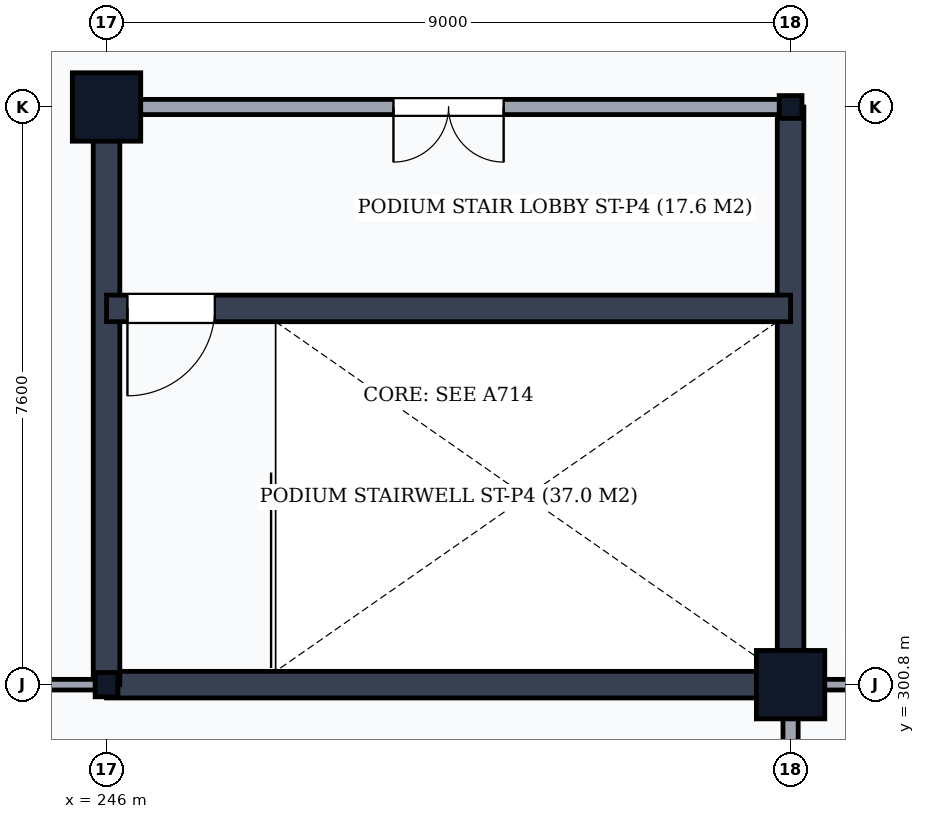
"""IFC4 building model, lengths in metres.
Left out: names, types, materials, properties, quantities, classifications, styles, units other than length and angle.
Written with IfcOpenShell. Run it as: python <this file> out.ifc"""

import sys

from ifc_helpers import new_model, si_unit, direction, frame, frame_2d, origin, origin_2d, place, context, subcontext, project, spatial, rectangle, circle, i_section, extrude, element, fill, save


model = new_model("IFC4")
c1 = context("Model", 3, precision=1e-05, world=origin(), true_north=direction((0.0, 1.0)))
c2 = subcontext(c1, "Body", "Model", "MODEL_VIEW")
j1 = project(units=[si_unit("LENGTHUNIT", "METRE"), si_unit("PLANEANGLEUNIT", "RADIAN")], contexts=[c1])
p1 = place(None, origin())
s1 = spatial("IfcSite", under=j1, at=p1, CompositionType="ELEMENT")
p2 = place(p1, origin())
s2 = spatial("IfcBuilding", under=s1, at=p2, CompositionType="ELEMENT")
p3 = place(p2, frame((0.0, 0.0, 15.6)))
s3 = spatial("IfcBuildingStorey", under=s2, at=p3, CompositionType="ELEMENT", Elevation=15.6)
p4 = place(p3, frame((246.0, 300.8, 0.0), z_axis=(0.0, 0.0, 1.0), x_axis=(1.0, 0.0, 0.0)))
e1 = element("IfcColumn", 1, at=p4, inside=s3, PredefinedType="COLUMN", context=c2, shape_type="SweptSolid", body=[
    extrude(i_section(OverallWidth=0.3, OverallDepth=0.32, WebThickness=0.011, FlangeThickness=0.021, FilletRadius=0.027, at=origin_2d()), origin(), (0.0, 0.0, 1.0), 4.8),
])
for number, where, z_axis, x_axis in (
    (2, (246.0, 308.4, 0.0), (0.0, 0.0, 1.0), (1.0, 0.0, 0.0)),
    (3, (255.0, 300.8, 0.0), (0.0, 0.0, 1.0), (1.0, 0.0, 0.0)),
):
    element("IfcColumn", number, at=place(p3, frame(where, z_axis=z_axis, x_axis=x_axis)), inside=s3, PredefinedType="COLUMN", context=c2, shape_type="SweptSolid", body=[
        extrude(circle(Radius=0.45, at=origin_2d()), origin(), (0.0, 0.0, 1.0), 4.8),
    ])
p5 = place(p3, frame((255.0, 308.4, 0.0), z_axis=(0.0, 0.0, 1.0), x_axis=(1.0, 0.0, 0.0)))
e4 = element("IfcColumn", 4, at=p5, inside=s3, PredefinedType="COLUMN", context=c2, shape_type="SweptSolid", body=[
    extrude(i_section(OverallWidth=0.3, OverallDepth=0.3, WebThickness=0.011, FlangeThickness=0.019, FilletRadius=0.027, at=origin_2d()), origin(), (0.0, 0.0, 1.0), 4.8),
])
p6 = place(p3, frame((246.0, 300.8, 0.0), z_axis=(0.0, 0.0, 1.0), x_axis=(1.0, 0.0, 0.0)))
e5 = element("IfcWall", 5, at=p6, inside=s3, PredefinedType="SHEAR", context=c2, shape_type="SweptSolid", body=[
    extrude(rectangle(XDim=9.0, YDim=0.35, at=frame_2d((4.5, 0.0))), origin(), (0.0, 0.0, 1.0), 4.55),
])
for number, where, z_axis, x_axis in (
    (6, (246.0, 300.8, 0.0), (0.0, 0.0, 1.0), (0.0, 1.0, 0.0)),
    (7, (255.0, 300.8, 0.0), (0.0, 0.0, 1.0), (0.0, 1.0, 0.0)),
):
    element("IfcWall", number, at=place(p3, frame(where, z_axis=z_axis, x_axis=x_axis)), inside=s3, PredefinedType="SHEAR", context=c2, shape_type="SweptSolid", body=[
        extrude(rectangle(XDim=7.6, YDim=0.35, at=frame_2d((3.8, 0.0))), origin(), (0.0, 0.0, 1.0), 4.55),
    ])
p7 = place(p3, frame((246.0, 305.75, 0.0), z_axis=(0.0, 0.0, 1.0), x_axis=(1.0, 0.0, 0.0)))
e8 = element("IfcWall", 8, at=p7, inside=s3, PredefinedType="SHEAR", context=c2, shape_type="SweptSolid", body=[
    extrude(rectangle(XDim=9.0, YDim=0.35, at=frame_2d((4.5, 0.0))), origin(), (0.0, 0.0, 1.0), 4.55),
])
p8 = place(p7, frame((0.275, 0.0, 0.0)))
e9 = element("IfcOpeningElement", 9, at=p8, cuts=e8, PredefinedType="OPENING", context=c2, shape_type="SweptSolid", body=[
    extrude(rectangle(XDim=1.15, YDim=2.15, at=frame_2d((0.575, 1.075))), frame((0.0, 0.19, 0.0), z_axis=(0.0, -1.0, 0.0), x_axis=(1.0, 0.0, 0.0)), (0.0, 0.0, 1.0), 0.38),
])
p9 = place(p3, frame((246.0, 308.4, 0.0), z_axis=(0.0, 0.0, 1.0), x_axis=(1.0, 0.0, 0.0)))
e10 = element("IfcWall", 10, at=p9, inside=s3, PredefinedType="PARTITIONING", context=c2, shape_type="SweptSolid", body=[
    extrude(rectangle(XDim=9.0, YDim=0.2, at=frame_2d((4.5, 0.0))), origin(), (0.0, 0.0, 1.0), 3.898),
])
p10 = place(p9, frame((3.775, 0.0, 0.0)))
e11 = element("IfcOpeningElement", 11, at=p10, cuts=e10, PredefinedType="OPENING", context=c2, shape_type="SweptSolid", body=[
    extrude(rectangle(XDim=1.45, YDim=2.2, at=frame_2d((0.725, 1.1))), frame((0.0, 0.115, 0.0), z_axis=(0.0, -1.0, 0.0), x_axis=(1.0, 0.0, 0.0)), (0.0, 0.0, 1.0), 0.23),
])
p11 = place(p3, frame((255.0, 258.2, 0.0), z_axis=(0.0, 0.0, 1.0), x_axis=(0.0, 1.0, 0.0)))
e12 = element("IfcWall", 12, at=p11, inside=s3, PredefinedType="PARTITIONING", context=c2, shape_type="SweptSolid", body=[
    extrude(rectangle(XDim=42.6, YDim=0.2, at=frame_2d((21.3, 0.0))), origin(), (0.0, 0.0, 1.0), 3.998),
])
p12 = place(p11, frame((20.34, 0.0, 0.0)))
e13 = element("IfcOpeningElement", 13, at=p12, cuts=e12, PredefinedType="OPENING", context=c2, shape_type="SweptSolid", body=[
    extrude(rectangle(XDim=1.8, YDim=2.4, at=frame_2d((0.9, 1.2))), frame((0.0, 0.115, 0.0), z_axis=(0.0, -1.0, 0.0), x_axis=(1.0, 0.0, 0.0)), (0.0, 0.0, 1.0), 0.23),
])
p13 = place(p3, frame((205.0, 300.8, 0.0), z_axis=(0.0, 0.0, 1.0), x_axis=(1.0, 0.0, 0.0)))
e14 = element("IfcWall", 14, at=p13, inside=s3, PredefinedType="PARTITIONING", context=c2, shape_type="SweptSolid", body=[
    extrude(rectangle(XDim=41.0, YDim=0.14, at=frame_2d((20.5, 0.0))), origin(), (0.0, 0.0, 1.0), 3.898),
])
p14 = place(p3, frame((255.0, 300.8, 0.0), z_axis=(0.0, 0.0, 1.0), x_axis=(1.0, 0.0, 0.0)))
e15 = element("IfcWall", 15, at=p14, inside=s3, PredefinedType="PARTITIONING", context=c2, shape_type="SweptSolid", body=[
    extrude(rectangle(XDim=3.0, YDim=0.14, at=frame_2d((1.5, 0.0))), origin(), (0.0, 0.0, 1.0), 3.898),
])
p15 = place(p14, frame((0.95, 0.0, 0.0)))
e16 = element("IfcOpeningElement", 16, at=p15, cuts=e15, PredefinedType="OPENING", context=c2, shape_type="SweptSolid", body=[
    extrude(rectangle(XDim=1.1, YDim=2.1, at=frame_2d((0.55, 1.05))), frame((0.0, 0.085, 0.0), z_axis=(0.0, -1.0, 0.0), x_axis=(1.0, 0.0, 0.0)), (0.0, 0.0, 1.0), 0.17),
])
p16 = place(p8, frame((1.15, 0.0, 0.0), z_axis=(0.0, 0.0, 1.0), x_axis=(-1.0, 0.0, 0.0)))
e17 = element("IfcDoor", 17, at=p16, inside=s3, OperationType="SINGLE_SWING_RIGHT", PredefinedType="DOOR", context=c2, shape_type="SweptSolid", body=[
    extrude(rectangle(XDim=1.15, YDim=2.15, at=frame_2d((0.575, 1.075))), frame((0.0, 0.025, 0.0), z_axis=(0.0, -1.0, 0.0), x_axis=(1.0, 0.0, 0.0)), (0.0, 0.0, 1.0), 0.05),
])
fill(e9, e17)
p17 = place(p10, frame((1.45, 0.0, 0.0), z_axis=(0.0, 0.0, 1.0), x_axis=(-1.0, 0.0, 0.0)))
e18 = element("IfcDoor", 18, at=p17, inside=s3, OperationType="DOUBLE_DOOR_SINGLE_SWING", PredefinedType="DOOR", context=c2, shape_type="SweptSolid", body=[
    extrude(rectangle(XDim=1.45, YDim=2.2, at=frame_2d((0.725, 1.1))), frame((0.0, 0.025, 0.0), z_axis=(0.0, -1.0, 0.0), x_axis=(1.0, 0.0, 0.0)), (0.0, 0.0, 1.0), 0.05),
])
fill(e11, e18)
save(model, sys.argv[1])
